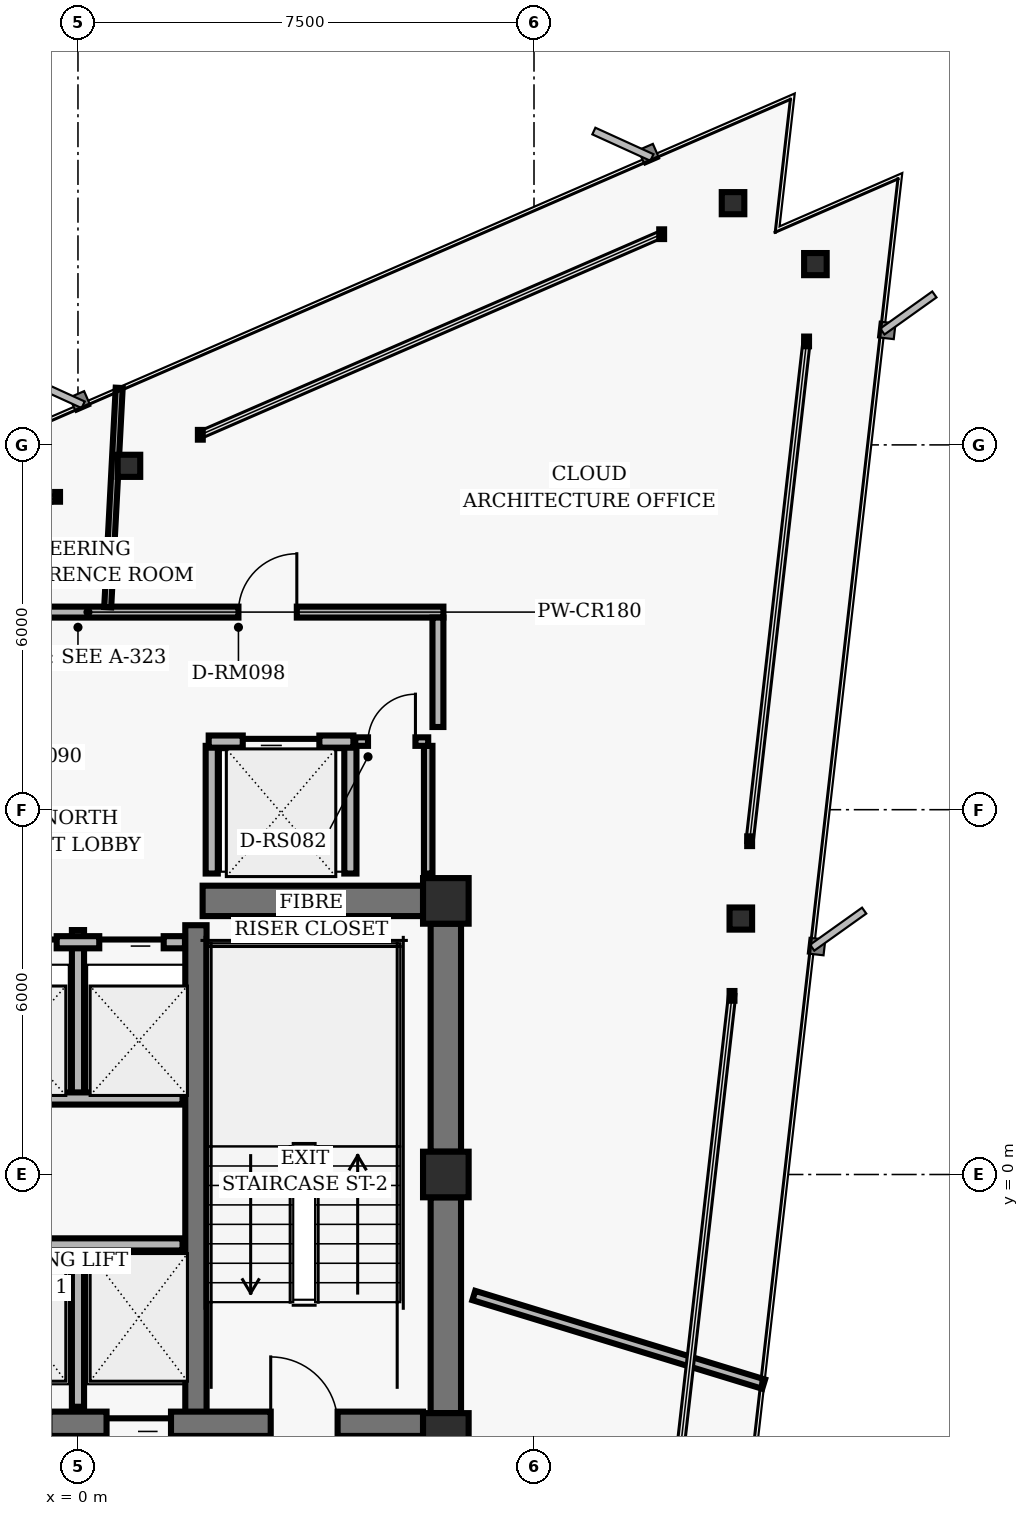
"""IFC4 building model, lengths in metres.
Left out: names, types, materials, properties, quantities, classifications, styles, units other than length and angle.
Written with IfcOpenShell. Run it as: python <this file> out.ifc"""

import sys

from ifc_helpers import new_model, si_unit, direction, frame, frame_2d, origin, origin_2d, place, context, subcontext, project, spatial, rectangle, hollow_rectangle, i_section, extrude, element, fill, save


model = new_model("IFC4")
c1 = context("Model", 3, precision=1e-05, world=origin(), true_north=direction((0.0, 1.0)))
c2 = subcontext(c1, "Body", "Model", "MODEL_VIEW")
j1 = project(units=[si_unit("LENGTHUNIT", "METRE"), si_unit("PLANEANGLEUNIT", "RADIAN")], contexts=[c1])
p1 = place(None, origin())
s1 = spatial("IfcSite", under=j1, at=p1, CompositionType="ELEMENT")
p2 = place(p1, origin())
s2 = spatial("IfcBuilding", under=s1, at=p2, CompositionType="ELEMENT")
p3 = place(p2, frame((0.0, 0.0, 227.04)))
s3 = spatial("IfcBuildingStorey", under=s2, at=p3, CompositionType="ELEMENT", Elevation=227.04)
for number, where, z_axis, x_axis in (
    (1, (6.05, 4.5, 0.0), (0.0, 0.0, 1.0), (1.0, 0.0, 0.0)),
    (2, (6.05, 0.0, 0.0), (0.0, 0.0, 1.0), (1.0, 0.0, 0.0)),
    (3, (6.05, -4.3, 0.0), (0.0, 0.0, 1.0), (1.0, 0.0, 0.0)),
):
    element("IfcColumn", number, at=place(p3, frame(where, z_axis=z_axis, x_axis=x_axis)), inside=s3, PredefinedType="COLUMN", context=c2, shape_type="SweptSolid", body=[
        extrude(hollow_rectangle(XDim=0.75, YDim=0.75, WallThickness=0.05, InnerFilletRadius=0.02, OuterFilletRadius=0.04, at=origin_2d()), origin(), (0.0, 0.0, 1.0), 3.04),
    ])
p4 = place(p3, frame((6.05, 0.375, 0.0), z_axis=(0.0, 0.0, 1.0), x_axis=(0.0, 1.0, 0.0)))
e4 = element("IfcWall", 4, at=p4, inside=s3, PredefinedType="SHEAR", context=c2, shape_type="SweptSolid", body=[
    extrude(rectangle(XDim=3.75, YDim=0.5, at=frame_2d((1.875, 0.0))), origin(), (0.0, 0.0, 1.0), 2.798),
])
p5 = place(p3, frame((6.05, -3.925, 0.0), z_axis=(0.0, 0.0, 1.0), x_axis=(0.0, 1.0, 0.0)))
e5 = element("IfcWall", 5, at=p5, inside=s3, PredefinedType="SHEAR", context=c2, shape_type="SweptSolid", body=[
    extrude(rectangle(XDim=3.55, YDim=0.5, at=frame_2d((1.775, 0.0))), origin(), (0.0, 0.0, 1.0), 2.798),
])
p6 = place(p3, frame((1.94, -4.1, 0.0), z_axis=(0.0, 0.0, 1.0), x_axis=(0.0, 1.0, 0.0)))
e6 = element("IfcWall", 6, at=p6, inside=s3, PredefinedType="SHEAR", context=c2, shape_type="SweptSolid", body=[
    extrude(rectangle(XDim=8.2, YDim=0.35, at=frame_2d((4.1, 0.0))), origin(), (0.0, 0.0, 1.0), 2.798),
])
p7 = place(p3, frame((-5.675, -4.1, 0.0), z_axis=(0.0, 0.0, 1.0), x_axis=(1.0, 0.0, 0.0)))
e7 = element("IfcWall", 7, at=p7, inside=s3, PredefinedType="SHEAR", context=c2, shape_type="SweptSolid", body=[
    extrude(rectangle(XDim=11.35, YDim=0.4, at=frame_2d((5.675, 0.0))), origin(), (0.0, 0.0, 1.0), 2.798),
])
p8 = place(p7, frame((1.405, 0.0, 0.0)))
e8 = element("IfcOpeningElement", 8, at=p8, cuts=e7, PredefinedType="OPENING", context=c2, shape_type="SweptSolid", body=[
    extrude(rectangle(XDim=1.1, YDim=2.04, at=frame_2d((0.55, 1.02))), frame((0.0, 0.21, 0.0), z_axis=(0.0, -1.0, 0.0), x_axis=(1.0, 0.0, 0.0)), (0.0, 0.0, 1.0), 0.42),
])
p9 = place(p7, frame((8.845, 0.0, 0.0)))
e9 = element("IfcOpeningElement", 9, at=p9, cuts=e7, PredefinedType="OPENING", context=c2, shape_type="SweptSolid", body=[
    extrude(rectangle(XDim=1.1, YDim=2.04, at=frame_2d((0.55, 1.02))), frame((0.0, 0.21, 0.0), z_axis=(0.0, -1.0, 0.0), x_axis=(1.0, 0.0, 0.0)), (0.0, 0.0, 1.0), 0.42),
])
p10 = place(p7, frame((4.145, 0.0, 0.0)))
e10 = element("IfcOpeningElement", 10, at=p10, cuts=e7, PredefinedType="OPENING", context=c2, shape_type="SweptSolid", body=[
    extrude(rectangle(XDim=1.06, YDim=2.04, at=frame_2d((0.53, 1.02))), frame((0.0, 0.21, 0.0), z_axis=(0.0, -1.0, 0.0), x_axis=(1.0, 0.0, 0.0)), (0.0, 0.0, 1.0), 0.42),
])
p11 = place(p7, frame((6.145, 0.0, 0.0)))
e11 = element("IfcOpeningElement", 11, at=p11, cuts=e7, PredefinedType="OPENING", context=c2, shape_type="SweptSolid", body=[
    extrude(rectangle(XDim=1.06, YDim=2.04, at=frame_2d((0.53, 1.02))), frame((0.0, 0.21, 0.0), z_axis=(0.0, -1.0, 0.0), x_axis=(1.0, 0.0, 0.0)), (0.0, 0.0, 1.0), 0.42),
])
p12 = place(p3, frame((2.05, 4.5, 0.0), z_axis=(0.0, 0.0, 1.0), x_axis=(1.0, 0.0, 0.0)))
e12 = element("IfcWall", 12, at=p12, inside=s3, PredefinedType="SHEAR", context=c2, shape_type="SweptSolid", body=[
    extrude(rectangle(XDim=3.625, YDim=0.5, at=frame_2d((1.812, 0.0))), origin(), (0.0, 0.0, 1.0), 2.798),
])
for number, where, z_axis, x_axis in (
    (13, (10.901, 4.21, 0.0), (0.0, 0.0, 1.0), (1.0, 0.0, 0.0)),
    (14, (12.128, 14.973, 0.0), (0.0, 0.0, 1.0), (1.0, 0.0, 0.0)),
    (15, (10.773, 15.976, 0.0), (0.0, 0.0, 1.0), (1.0, 0.0, 0.0)),
    (16, (0.838, 11.656, 0.0), (0.0, 0.0, 1.0), (1.0, 0.0, 0.0)),
):
    element("IfcColumn", number, at=place(p3, frame(where, z_axis=z_axis, x_axis=x_axis)), inside=s3, PredefinedType="COLUMN", context=c2, shape_type="SweptSolid", body=[
        extrude(i_section(OverallWidth=0.371, OverallDepth=0.364, WebThickness=0.013, FlangeThickness=0.022, FilletRadius=0.015, at=origin_2d()), origin(), (0.0, 0.0, 1.0), 3.04),
    ])
p13 = place(p3, frame((0.0, -3.82, 0.0), z_axis=(0.0, 0.0, 1.0), x_axis=(0.0, 1.0, 0.0)))
e17 = element("IfcWall", 17, at=p13, inside=s3, PredefinedType="PARTITIONING", context=c2, shape_type="SweptSolid", body=[
    extrude(rectangle(XDim=2.67, YDim=0.2, at=frame_2d((1.335, 0.0))), origin(), (0.0, 0.0, 1.0), 2.773),
])
p14 = place(p3, frame((-1.72, -1.15, 0.0), z_axis=(0.0, 0.0, 1.0), x_axis=(1.0, 0.0, 0.0)))
e18 = element("IfcWall", 18, at=p14, inside=s3, PredefinedType="PARTITIONING", context=c2, shape_type="SweptSolid", body=[
    extrude(rectangle(XDim=3.44, YDim=0.2, at=frame_2d((1.72, 0.0))), origin(), (0.0, 0.0, 1.0), 2.773),
])
p15 = place(p3, frame((0.0, 1.25, 0.0), z_axis=(0.0, 0.0, 1.0), x_axis=(0.0, 1.0, 0.0)))
e19 = element("IfcWall", 19, at=p15, inside=s3, PredefinedType="PARTITIONING", context=c2, shape_type="SweptSolid", body=[
    extrude(rectangle(XDim=2.77, YDim=0.2, at=frame_2d((1.385, 0.0))), origin(), (0.0, 0.0, 1.0), 2.773),
])
p16 = place(p3, frame((-1.72, 1.25, 0.0), z_axis=(0.0, 0.0, 1.0), x_axis=(1.0, 0.0, 0.0)))
e20 = element("IfcWall", 20, at=p16, inside=s3, PredefinedType="PARTITIONING", context=c2, shape_type="SweptSolid", body=[
    extrude(rectangle(XDim=3.44, YDim=0.2, at=frame_2d((1.72, 0.0))), origin(), (0.0, 0.0, 1.0), 2.773),
])
p17 = place(p3, frame((-1.76, 3.82, 0.0), z_axis=(0.0, 0.0, 1.0), x_axis=(1.0, 0.0, 0.0)))
e21 = element("IfcWall", 21, at=p17, inside=s3, PredefinedType="PARTITIONING", context=c2, shape_type="SweptSolid", body=[
    extrude(rectangle(XDim=3.52, YDim=0.2, at=frame_2d((1.76, 0.0))), origin(), (0.0, 0.0, 1.0), 2.773),
])
p18 = place(p17, frame((0.35, 0.0, 0.0)))
e22 = element("IfcOpeningElement", 22, at=p18, cuts=e21, PredefinedType="OPENING", context=c2, shape_type="SweptSolid", body=[
    extrude(rectangle(XDim=1.06, YDim=2.04, at=frame_2d((0.53, 1.02))), frame((0.0, 0.11, 0.0), z_axis=(0.0, -1.0, 0.0), x_axis=(1.0, 0.0, 0.0)), (0.0, 0.0, 1.0), 0.22),
])
p19 = place(p17, frame((2.11, 0.0, 0.0)))
e23 = element("IfcOpeningElement", 23, at=p19, cuts=e21, PredefinedType="OPENING", context=c2, shape_type="SweptSolid", body=[
    extrude(rectangle(XDim=1.06, YDim=2.04, at=frame_2d((0.53, 1.02))), frame((0.0, 0.11, 0.0), z_axis=(0.0, -1.0, 0.0), x_axis=(1.0, 0.0, 0.0)), (0.0, 0.0, 1.0), 0.22),
])
for number, where, z_axis, x_axis in (
    (24, (2.2, 4.95, 0.0), (0.0, 0.0, 1.0), (0.0, 1.0, 0.0)),
    (25, (4.48, 4.95, 0.0), (0.0, 0.0, 1.0), (0.0, 1.0, 0.0)),
):
    element("IfcWall", number, at=place(p3, frame(where, z_axis=z_axis, x_axis=x_axis)), inside=s3, PredefinedType="PARTITIONING", context=c2, shape_type="SweptSolid", body=[
        extrude(rectangle(XDim=2.1, YDim=0.2, at=frame_2d((1.05, 0.0))), origin(), (0.0, 0.0, 1.0), 2.773),
    ])
p20 = place(p3, frame((2.15, 7.12, 0.0), z_axis=(0.0, 0.0, 1.0), x_axis=(1.0, 0.0, 0.0)))
e26 = element("IfcWall", 26, at=p20, inside=s3, PredefinedType="PARTITIONING", context=c2, shape_type="SweptSolid", body=[
    extrude(rectangle(XDim=2.38, YDim=0.2, at=frame_2d((1.19, 0.0))), origin(), (0.0, 0.0, 1.0), 2.395),
])
p21 = place(p20, frame((0.56, 0.0, 0.0)))
e27 = element("IfcOpeningElement", 27, at=p21, cuts=e26, PredefinedType="OPENING", context=c2, shape_type="SweptSolid", body=[
    extrude(rectangle(XDim=1.26, YDim=2.06, at=frame_2d((0.63, 1.03))), frame((0.0, 0.11, 0.0), z_axis=(0.0, -1.0, 0.0), x_axis=(1.0, 0.0, 0.0)), (0.0, 0.0, 1.0), 0.22),
])
p22 = place(p3, frame((5.76, 4.95, 0.0), z_axis=(0.0, 0.0, 1.0), x_axis=(0.0, 1.0, 0.0)))
e28 = element("IfcWall", 28, at=p22, inside=s3, PredefinedType="PARTITIONING", context=c2, shape_type="SweptSolid", body=[
    extrude(rectangle(XDim=2.1, YDim=0.14, at=frame_2d((1.05, 0.0))), origin(), (0.0, 0.0, 1.0), 2.773),
])
p23 = place(p3, frame((4.56, 7.12, 0.0), z_axis=(0.0, 0.0, 1.0), x_axis=(1.0, 0.0, 0.0)))
e29 = element("IfcWall", 29, at=p23, inside=s3, PredefinedType="PARTITIONING", context=c2, shape_type="SweptSolid", body=[
    extrude(rectangle(XDim=1.2, YDim=0.14, at=frame_2d((0.6, 0.0))), origin(), (0.0, 0.0, 1.0), 2.773),
])
p24 = place(p23, frame((0.21, 0.0, 0.0)))
e30 = element("IfcOpeningElement", 30, at=p24, cuts=e29, PredefinedType="OPENING", context=c2, shape_type="SweptSolid", body=[
    extrude(rectangle(XDim=0.78, YDim=2.01, at=frame_2d((0.39, 1.005))), frame((0.0, 0.08, 0.0), z_axis=(0.0, -1.0, 0.0), x_axis=(1.0, 0.0, 0.0)), (0.0, 0.0, 1.0), 0.16),
])
p25 = place(p3, frame((-7.29, 9.25, 0.0), z_axis=(0.0, 0.0, 1.0), x_axis=(1.0, 0.0, 0.0)))
e31 = element("IfcWall", 31, at=p25, inside=s3, PredefinedType="PARTITIONING", context=c2, shape_type="SweptSolid", body=[
    extrude(rectangle(XDim=13.3, YDim=0.18, at=frame_2d((6.65, 0.0))), origin(), (0.0, 0.0, 1.0), 2.395),
])
p26 = place(p25, frame((9.929, 0.0, 0.0)))
e32 = element("IfcOpeningElement", 32, at=p26, cuts=e31, PredefinedType="OPENING", context=c2, shape_type="SweptSolid", body=[
    extrude(rectangle(XDim=0.96, YDim=2.02, at=frame_2d((0.48, 1.01))), frame((0.0, 0.1, 0.0), z_axis=(0.0, -1.0, 0.0), x_axis=(1.0, 0.0, 0.0)), (0.0, 0.0, 1.0), 0.2),
])
p27 = place(p25, frame((4.02, 0.0, 0.0)))
e33 = element("IfcOpeningElement", 33, at=p27, cuts=e31, PredefinedType="OPENING", context=c2, shape_type="SweptSolid", body=[
    extrude(rectangle(XDim=0.96, YDim=2.02, at=frame_2d((0.48, 1.01))), frame((0.0, 0.1, 0.0), z_axis=(0.0, -1.0, 0.0), x_axis=(1.0, 0.0, 0.0)), (0.0, 0.0, 1.0), 0.2),
])
p28 = place(p3, frame((5.92, 9.16, 0.0), z_axis=(0.0, 0.0, 1.0), x_axis=(0.0, -1.0, 0.0)))
e34 = element("IfcWall", 34, at=p28, inside=s3, PredefinedType="PARTITIONING", context=c2, shape_type="SweptSolid", body=[
    extrude(rectangle(XDim=1.8, YDim=0.18, at=frame_2d((0.9, 0.0))), origin(), (0.0, 0.0, 1.0), 2.773),
])
p29 = place(p3, frame((6.51, -1.99, 0.0), z_axis=(0.0, 0.0, 1.0), x_axis=(0.956296423481, -0.292398957653, 0.0)))
e35 = element("IfcWall", 35, at=p29, inside=s3, PredefinedType="PARTITIONING", context=c2, shape_type="SweptSolid", body=[
    extrude(rectangle(XDim=4.985, YDim=0.16, at=frame_2d((2.492, 0.0))), origin(), (0.0, 0.0, 1.0), 2.773),
])
p30 = place(p3, frame((0.489, 9.33, 0.0), z_axis=(0.0, 0.0, 1.0), x_axis=(0.05229993373, 0.998631421963, 0.0)))
e36 = element("IfcWall", 36, at=p30, inside=s3, PredefinedType="MOVABLE", context=c2, shape_type="SweptSolid", body=[
    extrude(rectangle(XDim=3.613, YDim=0.115, at=frame_2d((1.807, 0.0))), origin(), (0.0, 0.0, 1.0), 2.773),
])
p31 = place(p9, origin())
e37 = element("IfcDoor", 37, at=p31, inside=s3, OperationType="SINGLE_SWING_LEFT", PredefinedType="DOOR", context=c2, shape_type="SweptSolid", body=[
    extrude(rectangle(XDim=1.1, YDim=2.04, at=frame_2d((0.55, 1.02))), frame((0.0, 0.025, 0.0), z_axis=(0.0, -1.0, 0.0), x_axis=(1.0, 0.0, 0.0)), (0.0, 0.0, 1.0), 0.05),
])
fill(e9, e37)
p32 = place(p11, origin())
e38 = element("IfcDoor", 38, at=p32, inside=s3, OperationType="SLIDING_TO_RIGHT", PredefinedType="DOOR", context=c2, shape_type="SweptSolid", body=[
    extrude(rectangle(XDim=1.06, YDim=2.04, at=frame_2d((0.53, 1.02))), frame((0.0, 0.025, 0.0), z_axis=(0.0, -1.0, 0.0), x_axis=(1.0, 0.0, 0.0)), (0.0, 0.0, 1.0), 0.05),
])
fill(e11, e38)
p33 = place(p18, origin())
e39 = element("IfcDoor", 39, at=p33, inside=s3, OperationType="SLIDING_TO_LEFT", PredefinedType="DOOR", context=c2, shape_type="SweptSolid", body=[
    extrude(rectangle(XDim=1.06, YDim=2.04, at=frame_2d((0.53, 1.02))), frame((0.0, 0.025, 0.0), z_axis=(0.0, -1.0, 0.0), x_axis=(1.0, 0.0, 0.0)), (0.0, 0.0, 1.0), 0.05),
])
fill(e22, e39)
p34 = place(p19, origin())
e40 = element("IfcDoor", 40, at=p34, inside=s3, OperationType="SLIDING_TO_RIGHT", PredefinedType="DOOR", context=c2, shape_type="SweptSolid", body=[
    extrude(rectangle(XDim=1.06, YDim=2.04, at=frame_2d((0.53, 1.02))), frame((0.0, 0.025, 0.0), z_axis=(0.0, -1.0, 0.0), x_axis=(1.0, 0.0, 0.0)), (0.0, 0.0, 1.0), 0.05),
])
fill(e23, e40)
p35 = place(p21, origin())
e41 = element("IfcDoor", 41, at=p35, inside=s3, OperationType="SLIDING_TO_LEFT", PredefinedType="DOOR", context=c2, shape_type="SweptSolid", body=[
    extrude(rectangle(XDim=1.26, YDim=2.06, at=frame_2d((0.63, 1.03))), frame((0.0, 0.025, 0.0), z_axis=(0.0, -1.0, 0.0), x_axis=(1.0, 0.0, 0.0)), (0.0, 0.0, 1.0), 0.05),
])
fill(e27, e41)
p36 = place(p24, origin())
e42 = element("IfcDoor", 42, at=p36, inside=s3, OperationType="SINGLE_SWING_RIGHT", PredefinedType="DOOR", context=c2, shape_type="SweptSolid", body=[
    extrude(rectangle(XDim=0.78, YDim=2.01, at=frame_2d((0.39, 1.005))), frame((0.0, 0.025, 0.0), z_axis=(0.0, -1.0, 0.0), x_axis=(1.0, 0.0, 0.0)), (0.0, 0.0, 1.0), 0.05),
])
fill(e30, e42)
p37 = place(p26, origin())
e43 = element("IfcDoor", 43, at=p37, inside=s3, OperationType="SINGLE_SWING_RIGHT", PredefinedType="DOOR", context=c2, shape_type="SweptSolid", body=[
    extrude(rectangle(XDim=0.96, YDim=2.02, at=frame_2d((0.48, 1.01))), frame((0.0, 0.025, 0.0), z_axis=(0.0, -1.0, 0.0), x_axis=(1.0, 0.0, 0.0)), (0.0, 0.0, 1.0), 0.05),
])
fill(e32, e43)
save(model, sys.argv[1])
